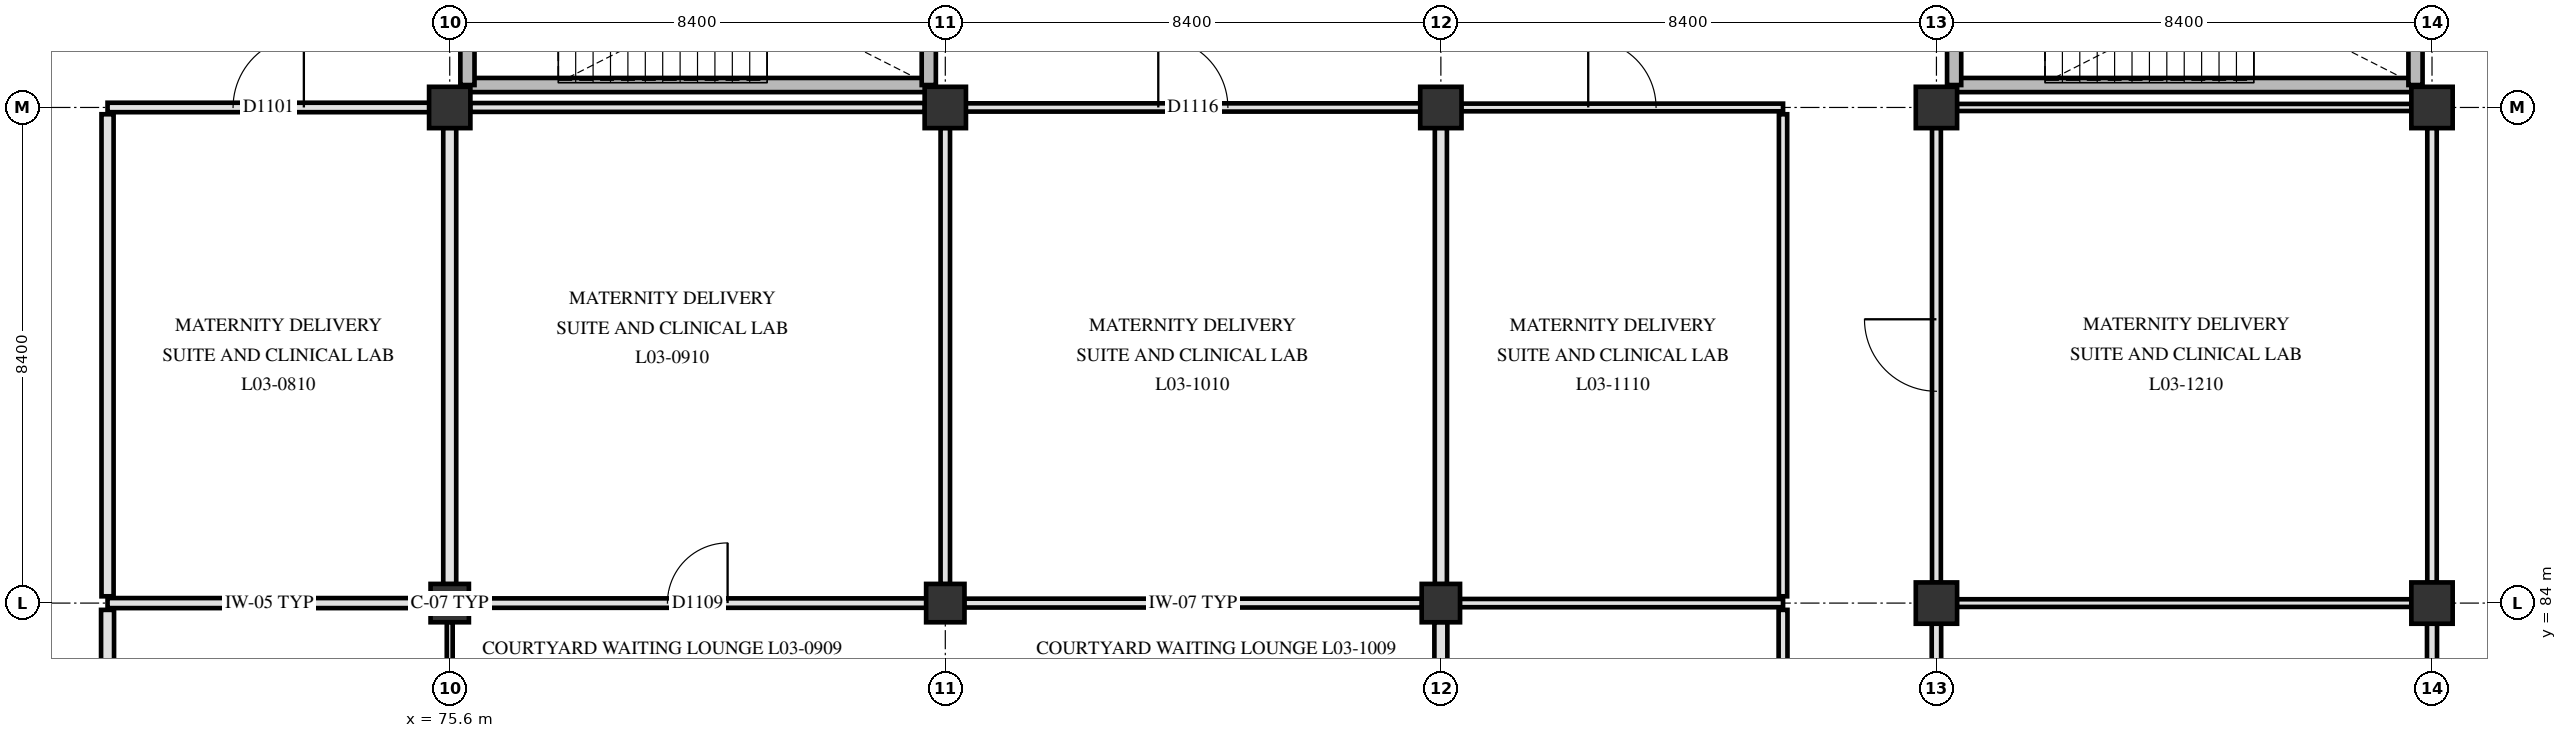
"""IFC4 building model, lengths in metres.
Left out: names, types, materials, properties, quantities, classifications, styles, units other than length and angle.
Written with IfcOpenShell. Run it as: python <this file> out.ifc"""

import sys

from ifc_helpers import new_model, si_unit, direction, frame, frame_2d, origin, origin_2d, place, context, subcontext, project, spatial, rectangle, circle, extrude, element, fill, save


model = new_model("IFC4")
c1 = context("Model", 3, precision=1e-05, world=origin(), true_north=direction((0.0, 1.0)))
c2 = subcontext(c1, "Body", "Model", "MODEL_VIEW")
j1 = project(units=[si_unit("LENGTHUNIT", "METRE"), si_unit("PLANEANGLEUNIT", "RADIAN")], contexts=[c1])
p1 = place(None, origin())
s1 = spatial("IfcSite", under=j1, at=p1, CompositionType="ELEMENT")
p2 = place(p1, origin())
s2 = spatial("IfcBuilding", under=s1, at=p2, CompositionType="ELEMENT")
p3 = place(p2, frame((0.0, 0.0, 14.4)))
s3 = spatial("IfcBuildingStorey", under=s2, at=p3, CompositionType="ELEMENT", Elevation=14.4)
p4 = place(p3, frame((75.6, 84.0, 0.0), z_axis=(0.0, 0.0, 1.0), x_axis=(1.0, 0.0, 0.0)))
e1 = element("IfcColumn", 1, at=p4, inside=s3, PredefinedType="COLUMN", context=c2, shape_type="SweptSolid", body=[
    extrude(circle(Radius=0.325, at=origin_2d()), origin(), (0.0, 0.0, 1.0), 4.2),
])
p5 = place(p3, frame((75.6, 92.4, 0.0), z_axis=(0.0, 0.0, 1.0), x_axis=(1.0, 0.0, 0.0)))
e2 = element("IfcColumn", 2, at=p5, inside=s3, PredefinedType="COLUMN", context=c2, shape_type="SweptSolid", body=[
    extrude(rectangle(XDim=0.7, YDim=0.7, at=origin_2d()), origin(), (0.0, 0.0, 1.0), 4.2),
])
p6 = place(p3, frame((84.0, 84.0, 0.0), z_axis=(0.0, 0.0, 1.0), x_axis=(1.0, 0.0, 0.0)))
e3 = element("IfcColumn", 3, at=p6, inside=s3, PredefinedType="COLUMN", context=c2, shape_type="SweptSolid", body=[
    extrude(circle(Radius=0.325, at=origin_2d()), origin(), (0.0, 0.0, 1.0), 4.2),
])
p7 = place(p3, frame((84.0, 92.4, 0.0), z_axis=(0.0, 0.0, 1.0), x_axis=(1.0, 0.0, 0.0)))
e4 = element("IfcColumn", 4, at=p7, inside=s3, PredefinedType="COLUMN", context=c2, shape_type="SweptSolid", body=[
    extrude(rectangle(XDim=0.7, YDim=0.7, at=origin_2d()), origin(), (0.0, 0.0, 1.0), 4.2),
])
p8 = place(p3, frame((92.4, 84.0, 0.0), z_axis=(0.0, 0.0, 1.0), x_axis=(1.0, 0.0, 0.0)))
e5 = element("IfcColumn", 5, at=p8, inside=s3, PredefinedType="COLUMN", context=c2, shape_type="SweptSolid", body=[
    extrude(circle(Radius=0.325, at=origin_2d()), origin(), (0.0, 0.0, 1.0), 4.2),
])
for number, where, z_axis, x_axis in (
    (6, (92.4, 92.4, 0.0), (0.0, 0.0, 1.0), (1.0, 0.0, 0.0)),
    (7, (100.8, 84.0, 0.0), (0.0, 0.0, 1.0), (1.0, 0.0, 0.0)),
    (8, (100.8, 92.4, 0.0), (0.0, 0.0, 1.0), (1.0, 0.0, 0.0)),
    (9, (109.2, 84.0, 0.0), (0.0, 0.0, 1.0), (1.0, 0.0, 0.0)),
    (10, (109.2, 92.4, 0.0), (0.0, 0.0, 1.0), (1.0, 0.0, 0.0)),
):
    element("IfcColumn", number, at=place(p3, frame(where, z_axis=z_axis, x_axis=x_axis)), inside=s3, PredefinedType="COLUMN", context=c2, shape_type="SweptSolid", body=[
        extrude(rectangle(XDim=0.7, YDim=0.7, at=origin_2d()), origin(), (0.0, 0.0, 1.0), 4.2),
    ])
p9 = place(p3, frame((101.1, 92.78, 0.0), z_axis=(0.0, 0.0, 1.0), x_axis=(1.0, 0.0, 0.0)))
e11 = element("IfcWall", 11, at=p9, inside=s3, PredefinedType="SHEAR", context=c2, shape_type="SweptSolid", body=[
    extrude(rectangle(XDim=7.82, YDim=0.24, at=frame_2d((3.91, 0.0))), origin(), (0.0, 0.0, 1.0), 3.9),
])
for number, where, z_axis, x_axis in (
    (12, (101.1, 92.78, 0.0), (0.0, 0.0, 1.0), (0.0, 1.0, 0.0)),
    (13, (108.92, 92.78, 0.0), (0.0, 0.0, 1.0), (0.0, 1.0, 0.0)),
):
    element("IfcWall", number, at=place(p3, frame(where, z_axis=z_axis, x_axis=x_axis)), inside=s3, PredefinedType="SHEAR", context=c2, shape_type="SweptSolid", body=[
        extrude(rectangle(XDim=3.32, YDim=0.24, at=frame_2d((1.66, 0.0))), origin(), (0.0, 0.0, 1.0), 3.9),
    ])
p10 = place(p3, frame((75.9, 92.78, 0.0), z_axis=(0.0, 0.0, 1.0), x_axis=(1.0, 0.0, 0.0)))
e14 = element("IfcWall", 14, at=p10, inside=s3, PredefinedType="SHEAR", context=c2, shape_type="SweptSolid", body=[
    extrude(rectangle(XDim=7.82, YDim=0.24, at=frame_2d((3.91, 0.0))), origin(), (0.0, 0.0, 1.0), 3.9),
])
for number, where, z_axis, x_axis in (
    (15, (75.9, 92.78, 0.0), (0.0, 0.0, 1.0), (0.0, 1.0, 0.0)),
    (16, (83.72, 92.78, 0.0), (0.0, 0.0, 1.0), (0.0, 1.0, 0.0)),
):
    element("IfcWall", number, at=place(p3, frame(where, z_axis=z_axis, x_axis=x_axis)), inside=s3, PredefinedType="SHEAR", context=c2, shape_type="SweptSolid", body=[
        extrude(rectangle(XDim=3.32, YDim=0.24, at=frame_2d((1.66, 0.0))), origin(), (0.0, 0.0, 1.0), 3.9),
    ])
p11 = place(p3, frame((69.8, 84.0, 0.0), z_axis=(0.0, 0.0, 1.0), x_axis=(1.0, 0.0, 0.0)))
e17 = element("IfcWall", 17, at=p11, inside=s3, PredefinedType="PARTITIONING", context=c2, shape_type="SweptSolid", body=[
    extrude(rectangle(XDim=5.48, YDim=0.17, at=frame_2d((2.74, 0.0))), origin(), (0.0, 0.0, 1.0), 3.28),
])
p12 = place(p3, frame((75.92, 84.0, 0.0), z_axis=(0.0, 0.0, 1.0), x_axis=(1.0, 0.0, 0.0)))
e18 = element("IfcWall", 18, at=p12, inside=s3, PredefinedType="PARTITIONING", context=c2, shape_type="SweptSolid", body=[
    extrude(rectangle(XDim=7.76, YDim=0.16, at=frame_2d((3.88, 0.0))), origin(), (0.0, 0.0, 1.0), 3.28),
])
p13 = place(p12, frame((3.37, 0.0, 0.0)))
e19 = element("IfcOpeningElement", 19, at=p13, cuts=e18, PredefinedType="OPENING", context=c2, shape_type="SweptSolid", body=[
    extrude(rectangle(XDim=1.02, YDim=2.12, at=frame_2d((0.51, 1.06))), frame((0.0, 0.09, 0.0), z_axis=(0.0, -1.0, 0.0), x_axis=(1.0, 0.0, 0.0)), (0.0, 0.0, 1.0), 0.18),
])
p14 = place(p3, frame((84.32, 84.0, 0.0), z_axis=(0.0, 0.0, 1.0), x_axis=(1.0, 0.0, 0.0)))
e20 = element("IfcWall", 20, at=p14, inside=s3, PredefinedType="PARTITIONING", context=c2, shape_type="SweptSolid", body=[
    extrude(rectangle(XDim=7.76, YDim=0.15, at=frame_2d((3.88, 0.0))), origin(), (0.0, 0.0, 1.0), 3.28),
])
p15 = place(p3, frame((92.72, 84.0, 0.0), z_axis=(0.0, 0.0, 1.0), x_axis=(1.0, 0.0, 0.0)))
e21 = element("IfcWall", 21, at=p15, inside=s3, PredefinedType="PARTITIONING", context=c2, shape_type="SweptSolid", body=[
    extrude(rectangle(XDim=5.48, YDim=0.14, at=frame_2d((2.74, 0.0))), origin(), (0.0, 0.0, 1.0), 3.29),
])
p16 = place(p3, frame((101.145, 84.0, 0.0), z_axis=(0.0, 0.0, 1.0), x_axis=(1.0, 0.0, 0.0)))
e22 = element("IfcWall", 22, at=p16, inside=s3, PredefinedType="PARTITIONING", context=c2, shape_type="SweptSolid", body=[
    extrude(rectangle(XDim=7.71, YDim=0.13, at=frame_2d((3.855, 0.0))), origin(), (0.0, 0.0, 1.0), 3.29),
])
p17 = place(p3, frame((69.8, 92.4, 0.0), z_axis=(0.0, 0.0, 1.0), x_axis=(1.0, 0.0, 0.0)))
e23 = element("IfcWall", 23, at=p17, inside=s3, PredefinedType="PARTITIONING", context=c2, shape_type="SweptSolid", body=[
    extrude(rectangle(XDim=5.455, YDim=0.16, at=frame_2d((2.728, 0.0))), origin(), (0.0, 0.0, 1.0), 2.88),
])
p18 = place(p17, frame((2.127, 0.0, 0.0)))
e24 = element("IfcOpeningElement", 24, at=p18, cuts=e23, PredefinedType="OPENING", context=c2, shape_type="SweptSolid", body=[
    extrude(rectangle(XDim=1.2, YDim=2.15, at=frame_2d((0.6, 1.075))), frame((0.0, 0.09, 0.0), z_axis=(0.0, -1.0, 0.0), x_axis=(1.0, 0.0, 0.0)), (0.0, 0.0, 1.0), 0.18),
])
p19 = place(p3, frame((75.945, 92.4, 0.0), z_axis=(0.0, 0.0, 1.0), x_axis=(1.0, 0.0, 0.0)))
e25 = element("IfcWall", 25, at=p19, inside=s3, PredefinedType="PARTITIONING", context=c2, shape_type="SweptSolid", body=[
    extrude(rectangle(XDim=7.71, YDim=0.15, at=frame_2d((3.855, 0.0))), origin(), (0.0, 0.0, 1.0), 2.88),
])
p20 = place(p3, frame((84.345, 92.4, 0.0), z_axis=(0.0, 0.0, 1.0), x_axis=(1.0, 0.0, 0.0)))
e26 = element("IfcWall", 26, at=p20, inside=s3, PredefinedType="PARTITIONING", context=c2, shape_type="SweptSolid", body=[
    extrude(rectangle(XDim=7.71, YDim=0.14, at=frame_2d((3.855, 0.0))), origin(), (0.0, 0.0, 1.0), 2.88),
])
p21 = place(p20, frame((3.265, 0.0, 0.0)))
e27 = element("IfcOpeningElement", 27, at=p21, cuts=e26, PredefinedType="OPENING", context=c2, shape_type="SweptSolid", body=[
    extrude(rectangle(XDim=1.18, YDim=2.18, at=frame_2d((0.59, 1.09))), frame((0.0, 0.08, 0.0), z_axis=(0.0, -1.0, 0.0), x_axis=(1.0, 0.0, 0.0)), (0.0, 0.0, 1.0), 0.16),
])
p22 = place(p3, frame((92.745, 92.4, 0.0), z_axis=(0.0, 0.0, 1.0), x_axis=(1.0, 0.0, 0.0)))
e28 = element("IfcWall", 28, at=p22, inside=s3, PredefinedType="PARTITIONING", context=c2, shape_type="SweptSolid", body=[
    extrude(rectangle(XDim=5.455, YDim=0.13, at=frame_2d((2.728, 0.0))), origin(), (0.0, 0.0, 1.0), 2.89),
])
p23 = place(p22, frame((2.153, 0.0, 0.0)))
e29 = element("IfcOpeningElement", 29, at=p23, cuts=e28, PredefinedType="OPENING", context=c2, shape_type="SweptSolid", body=[
    extrude(rectangle(XDim=1.15, YDim=2.15, at=frame_2d((0.575, 1.075))), frame((0.0, 0.075, 0.0), z_axis=(0.0, -1.0, 0.0), x_axis=(1.0, 0.0, 0.0)), (0.0, 0.0, 1.0), 0.15),
])
p24 = place(p3, frame((101.145, 92.4, 0.0), z_axis=(0.0, 0.0, 1.0), x_axis=(1.0, 0.0, 0.0)))
e30 = element("IfcWall", 30, at=p24, inside=s3, PredefinedType="PARTITIONING", context=c2, shape_type="SweptSolid", body=[
    extrude(rectangle(XDim=7.71, YDim=0.12, at=frame_2d((3.855, 0.0))), origin(), (0.0, 0.0, 1.0), 2.89),
])
p25 = place(p3, frame((69.8, 78.315, 0.0), z_axis=(0.0, 0.0, 1.0), x_axis=(0.0, 1.0, 0.0)))
e31 = element("IfcWall", 31, at=p25, inside=s3, PredefinedType="PARTITIONING", context=c2, shape_type="SweptSolid", body=[
    extrude(rectangle(XDim=5.57, YDim=0.22, at=frame_2d((2.785, 0.0))), origin(), (0.0, 0.0, 1.0), 3.28),
])
p26 = place(p3, frame((69.8, 84.115, 0.0), z_axis=(0.0, 0.0, 1.0), x_axis=(0.0, 1.0, 0.0)))
e32 = element("IfcWall", 32, at=p26, inside=s3, PredefinedType="PARTITIONING", context=c2, shape_type="SweptSolid", body=[
    extrude(rectangle(XDim=8.17, YDim=0.205, at=frame_2d((4.085, 0.0))), origin(), (0.0, 0.0, 1.0), 2.88),
])
p27 = place(p3, frame((75.6, 78.315, 0.0), z_axis=(0.0, 0.0, 1.0), x_axis=(0.0, 1.0, 0.0)))
e33 = element("IfcWall", 33, at=p27, inside=s3, PredefinedType="PARTITIONING", context=c2, shape_type="SweptSolid", body=[
    extrude(rectangle(XDim=5.365, YDim=0.1, at=frame_2d((2.683, 0.0))), origin(), (0.0, 0.0, 1.0), 3.33),
])
p28 = place(p3, frame((75.6, 84.32, 0.0), z_axis=(0.0, 0.0, 1.0), x_axis=(0.0, 1.0, 0.0)))
e34 = element("IfcWall", 34, at=p28, inside=s3, PredefinedType="PARTITIONING", context=c2, shape_type="SweptSolid", body=[
    extrude(rectangle(XDim=7.735, YDim=0.22, at=frame_2d((3.867, 0.0))), origin(), (0.0, 0.0, 1.0), 3.33),
])
p29 = place(p3, frame((84.0, 84.32, 0.0), z_axis=(0.0, 0.0, 1.0), x_axis=(0.0, 1.0, 0.0)))
e35 = element("IfcWall", 35, at=p29, inside=s3, PredefinedType="PARTITIONING", context=c2, shape_type="SweptSolid", body=[
    extrude(rectangle(XDim=7.735, YDim=0.16, at=frame_2d((3.867, 0.0))), origin(), (0.0, 0.0, 1.0), 3.33),
])
p30 = place(p3, frame((92.4, 78.315, 0.0), z_axis=(0.0, 0.0, 1.0), x_axis=(0.0, 1.0, 0.0)))
e36 = element("IfcWall", 36, at=p30, inside=s3, PredefinedType="PARTITIONING", context=c2, shape_type="SweptSolid", body=[
    extrude(rectangle(XDim=5.365, YDim=0.22, at=frame_2d((2.683, 0.0))), origin(), (0.0, 0.0, 1.0), 3.33),
])
p31 = place(p3, frame((92.4, 84.32, 0.0), z_axis=(0.0, 0.0, 1.0), x_axis=(0.0, 1.0, 0.0)))
e37 = element("IfcWall", 37, at=p31, inside=s3, PredefinedType="PARTITIONING", context=c2, shape_type="SweptSolid", body=[
    extrude(rectangle(XDim=7.735, YDim=0.205, at=frame_2d((3.867, 0.0))), origin(), (0.0, 0.0, 1.0), 3.33),
])
p32 = place(p3, frame((98.2, 78.315, 0.0), z_axis=(0.0, 0.0, 1.0), x_axis=(0.0, 1.0, 0.0)))
e38 = element("IfcWall", 38, at=p32, inside=s3, PredefinedType="PARTITIONING", context=c2, shape_type="SweptSolid", body=[
    extrude(rectangle(XDim=5.57, YDim=0.15, at=frame_2d((2.785, 0.0))), origin(), (0.0, 0.0, 1.0), 3.29),
])
p33 = place(p3, frame((98.2, 84.115, 0.0), z_axis=(0.0, 0.0, 1.0), x_axis=(0.0, 1.0, 0.0)))
e39 = element("IfcWall", 39, at=p33, inside=s3, PredefinedType="PARTITIONING", context=c2, shape_type="SweptSolid", body=[
    extrude(rectangle(XDim=8.17, YDim=0.14, at=frame_2d((4.085, 0.0))), origin(), (0.0, 0.0, 1.0), 2.89),
])
p34 = place(p3, frame((100.8, 78.315, 0.0), z_axis=(0.0, 0.0, 1.0), x_axis=(0.0, 1.0, 0.0)))
e40 = element("IfcWall", 40, at=p34, inside=s3, PredefinedType="PARTITIONING", context=c2, shape_type="SweptSolid", body=[
    extrude(rectangle(XDim=5.34, YDim=0.16, at=frame_2d((2.67, 0.0))), origin(), (0.0, 0.0, 1.0), 2.69),
])
p35 = place(p3, frame((100.8, 84.345, 0.0), z_axis=(0.0, 0.0, 1.0), x_axis=(0.0, 1.0, 0.0)))
e41 = element("IfcWall", 41, at=p35, inside=s3, PredefinedType="PARTITIONING", context=c2, shape_type="SweptSolid", body=[
    extrude(rectangle(XDim=7.71, YDim=0.15, at=frame_2d((3.855, 0.0))), origin(), (0.0, 0.0, 1.0), 2.69),
])
p36 = place(p35, frame((3.245, 0.0, 0.0)))
e42 = element("IfcOpeningElement", 42, at=p36, cuts=e41, PredefinedType="OPENING", context=c2, shape_type="SweptSolid", body=[
    extrude(rectangle(XDim=1.22, YDim=2.18, at=frame_2d((0.61, 1.09))), frame((0.0, 0.085, 0.0), z_axis=(0.0, -1.0, 0.0), x_axis=(1.0, 0.0, 0.0)), (0.0, 0.0, 1.0), 0.17),
])
p37 = place(p3, frame((109.2, 78.315, 0.0), z_axis=(0.0, 0.0, 1.0), x_axis=(0.0, 1.0, 0.0)))
e43 = element("IfcWall", 43, at=p37, inside=s3, PredefinedType="PARTITIONING", context=c2, shape_type="SweptSolid", body=[
    extrude(rectangle(XDim=5.34, YDim=0.17, at=frame_2d((2.67, 0.0))), origin(), (0.0, 0.0, 1.0), 3.34),
])
p38 = place(p3, frame((109.2, 84.345, 0.0), z_axis=(0.0, 0.0, 1.0), x_axis=(0.0, 1.0, 0.0)))
e44 = element("IfcWall", 44, at=p38, inside=s3, PredefinedType="PARTITIONING", context=c2, shape_type="SweptSolid", body=[
    extrude(rectangle(XDim=7.71, YDim=0.16, at=frame_2d((3.855, 0.0))), origin(), (0.0, 0.0, 1.0), 3.34),
])
p39 = place(p18, origin())
e45 = element("IfcDoor", 45, at=p39, inside=s3, OperationType="SINGLE_SWING_RIGHT", PredefinedType="DOOR", context=c2, shape_type="SweptSolid", body=[
    extrude(rectangle(XDim=1.2, YDim=2.15, at=frame_2d((0.6, 1.075))), frame((0.0, 0.025, 0.0), z_axis=(0.0, -1.0, 0.0), x_axis=(1.0, 0.0, 0.0)), (0.0, 0.0, 1.0), 0.05),
])
fill(e24, e45)
p40 = place(p13, origin())
e46 = element("IfcDoor", 46, at=p40, inside=s3, OperationType="SINGLE_SWING_RIGHT", PredefinedType="DOOR", context=c2, shape_type="SweptSolid", body=[
    extrude(rectangle(XDim=1.02, YDim=2.12, at=frame_2d((0.51, 1.06))), frame((0.0, 0.025, 0.0), z_axis=(0.0, -1.0, 0.0), x_axis=(1.0, 0.0, 0.0)), (0.0, 0.0, 1.0), 0.05),
])
fill(e19, e46)
p41 = place(p21, origin())
e47 = element("IfcDoor", 47, at=p41, inside=s3, OperationType="SINGLE_SWING_LEFT", PredefinedType="DOOR", context=c2, shape_type="SweptSolid", body=[
    extrude(rectangle(XDim=1.18, YDim=2.18, at=frame_2d((0.59, 1.09))), frame((0.0, 0.025, 0.0), z_axis=(0.0, -1.0, 0.0), x_axis=(1.0, 0.0, 0.0)), (0.0, 0.0, 1.0), 0.05),
])
fill(e27, e47)
p42 = place(p23, origin())
e48 = element("IfcDoor", 48, at=p42, inside=s3, OperationType="SINGLE_SWING_LEFT", PredefinedType="DOOR", context=c2, shape_type="SweptSolid", body=[
    extrude(rectangle(XDim=1.15, YDim=2.15, at=frame_2d((0.575, 1.075))), frame((0.0, 0.025, 0.0), z_axis=(0.0, -1.0, 0.0), x_axis=(1.0, 0.0, 0.0)), (0.0, 0.0, 1.0), 0.05),
])
fill(e29, e48)
p43 = place(p36, origin())
e49 = element("IfcDoor", 49, at=p43, inside=s3, OperationType="SINGLE_SWING_RIGHT", PredefinedType="DOOR", context=c2, shape_type="SweptSolid", body=[
    extrude(rectangle(XDim=1.22, YDim=2.18, at=frame_2d((0.61, 1.09))), frame((0.0, 0.025, 0.0), z_axis=(0.0, -1.0, 0.0), x_axis=(1.0, 0.0, 0.0)), (0.0, 0.0, 1.0), 0.05),
])
fill(e42, e49)
save(model, sys.argv[1])
